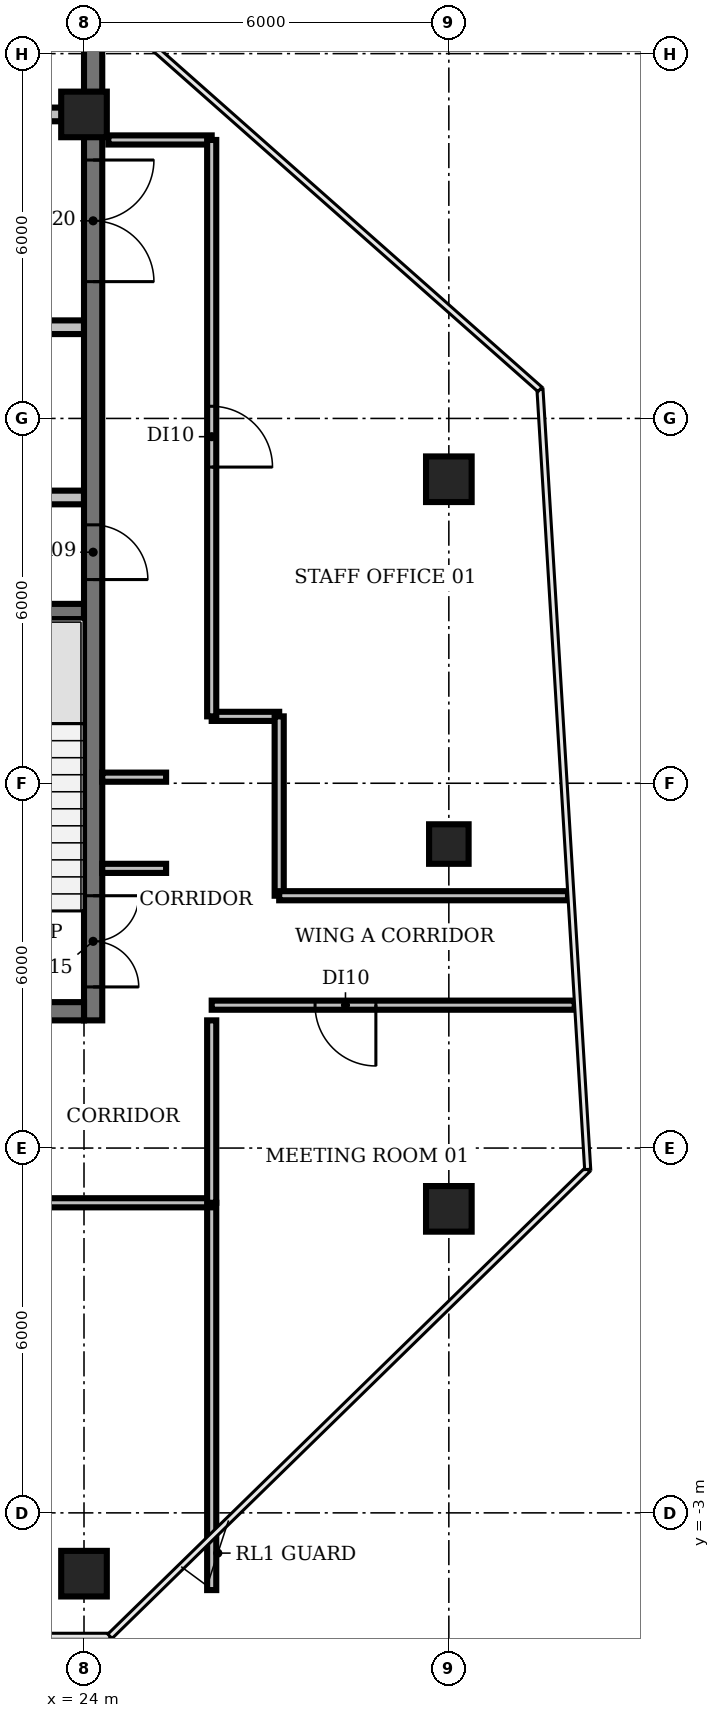
"""IFC4 building model, lengths in metres.
Left out: names, types, materials, properties, quantities, classifications, styles, units other than length and angle.
Written with IfcOpenShell. Run it as: python <this file> out.ifc"""

import sys

from ifc_helpers import new_model, si_unit, direction, frame, frame_2d, origin, origin_2d, place, context, subcontext, project, spatial, rectangle, circle, extrude, element, fill, save


model = new_model("IFC4")
c1 = context("Model", 3, precision=1e-05, world=origin(), true_north=direction((0.0, 1.0)))
c2 = subcontext(c1, "Body", "Model", "MODEL_VIEW")
j1 = project(units=[si_unit("LENGTHUNIT", "METRE"), si_unit("PLANEANGLEUNIT", "RADIAN")], contexts=[c1])
p1 = place(None, origin())
s1 = spatial("IfcSite", under=j1, at=p1, CompositionType="ELEMENT")
p2 = place(p1, origin())
s2 = spatial("IfcBuilding", under=s1, at=p2, CompositionType="ELEMENT")
p3 = place(p2, frame((0.0, 0.0, 318.8)))
s3 = spatial("IfcBuildingStorey", under=s2, at=p3, CompositionType="ELEMENT", Elevation=318.8)
for number, where, z_axis, x_axis in (
    (1, (24.0, -4.0, 0.0), (0.0, 0.0, 1.0), (1.0, 0.0, 0.0)),
    (2, (24.0, 20.0, 0.0), (0.0, 0.0, 1.0), (1.0, 0.0, 0.0)),
    (3, (30.0, 2.0, 0.0), (0.0, 0.0, 1.0), (1.0, 0.0, 0.0)),
):
    element("IfcColumn", number, at=place(p3, frame(where, z_axis=z_axis, x_axis=x_axis)), inside=s3, PredefinedType="COLUMN", context=c2, shape_type="SweptSolid", body=[
        extrude(circle(Radius=0.375, at=origin_2d()), origin(), (0.0, 0.0, 1.0), 3.9),
    ])
p4 = place(p3, frame((30.0, 8.0, 0.0), z_axis=(0.0, 0.0, 1.0), x_axis=(1.0, 0.0, 0.0)))
e4 = element("IfcColumn", 4, at=p4, inside=s3, PredefinedType="COLUMN", context=c2, shape_type="SweptSolid", body=[
    extrude(rectangle(XDim=0.65, YDim=0.65, at=origin_2d()), origin(), (0.0, 0.0, 1.0), 3.9),
])
p5 = place(p3, frame((30.0, 14.0, 0.0), z_axis=(0.0, 0.0, 1.0), x_axis=(1.0, 0.0, 0.0)))
e5 = element("IfcColumn", 5, at=p5, inside=s3, PredefinedType="COLUMN", context=c2, shape_type="SweptSolid", body=[
    extrude(circle(Radius=0.375, at=origin_2d()), origin(), (0.0, 0.0, 1.0), 3.9),
])
p6 = place(p3, frame((20.85, 11.825, 0.0), z_axis=(0.0, 0.0, 1.0), x_axis=(1.0, 0.0, 0.0)))
e6 = element("IfcWall", 6, at=p6, inside=s3, PredefinedType="SHEAR", context=c2, shape_type="SweptSolid", body=[
    extrude(rectangle(XDim=3.15, YDim=0.25, at=frame_2d((1.575, 0.0))), origin(), (0.0, 0.0, 1.0), 3.9),
])
p7 = place(p3, frame((16.6, 13.7, 0.0), z_axis=(0.0, 0.0, 1.0), x_axis=(1.0, 0.0, 0.0)))
e7 = element("IfcWall", 7, at=p7, inside=s3, PredefinedType="PARTITIONING", context=c2, shape_type="SweptSolid", body=[
    extrude(rectangle(XDim=7.4, YDim=0.225, at=frame_2d((3.7, 0.0))), origin(), (0.0, 0.0, 1.0), 3.9),
])
p8 = place(p3, frame((9.4, 16.5, 0.0), z_axis=(0.0, 0.0, 1.0), x_axis=(1.0, 0.0, 0.0)))
e8 = element("IfcWall", 8, at=p8, inside=s3, PredefinedType="PARTITIONING", context=c2, shape_type="SweptSolid", body=[
    extrude(rectangle(XDim=14.6, YDim=0.225, at=frame_2d((7.3, 0.0))), origin(), (0.0, 0.0, 1.0), 3.9),
])
p9 = place(p8, frame((0.55, 0.0, 0.0)))
e9 = element("IfcOpeningElement", 9, at=p9, cuts=e8, PredefinedType="OPENING", context=c2, shape_type="SweptSolid", body=[
    extrude(rectangle(XDim=0.9, YDim=2.1, at=frame_2d((0.45, 1.05))), frame((0.0, 0.123, 0.0), z_axis=(0.0, -1.0, 0.0), x_axis=(1.0, 0.0, 0.0)), (0.0, 0.0, 1.0), 0.245),
])
p10 = place(p8, frame((6.075, 0.0, 0.0)))
e10 = element("IfcOpeningElement", 10, at=p10, cuts=e8, PredefinedType="OPENING", context=c2, shape_type="SweptSolid", body=[
    extrude(rectangle(XDim=1.0, YDim=2.1, at=frame_2d((0.5, 1.05))), frame((0.0, 0.123, 0.0), z_axis=(0.0, -1.0, 0.0), x_axis=(1.0, 0.0, 0.0)), (0.0, 0.0, 1.0), 0.245),
])
p11 = place(p8, frame((12.4, 0.0, 0.0)))
e11 = element("IfcOpeningElement", 11, at=p11, cuts=e8, PredefinedType="OPENING", context=c2, shape_type="SweptSolid", body=[
    extrude(rectangle(XDim=1.0, YDim=2.1, at=frame_2d((0.5, 1.05))), frame((0.0, 0.123, 0.0), z_axis=(0.0, -1.0, 0.0), x_axis=(1.0, 0.0, 0.0)), (0.0, 0.0, 1.0), 0.245),
])
p12 = place(p3, frame((24.0, 20.0, 0.0), z_axis=(0.0, 0.0, 1.0), x_axis=(-1.0, 0.0, 0.0)))
e12 = element("IfcWall", 12, at=p12, inside=s3, PredefinedType="PARTITIONING", context=c2, shape_type="SweptSolid", body=[
    extrude(rectangle(XDim=14.6, YDim=0.225, at=frame_2d((7.3, 0.0))), origin(), (0.0, 0.0, 1.0), 3.9),
])
p13 = place(p12, frame((12.75, 0.0, 0.0)))
e13 = element("IfcOpeningElement", 13, at=p13, cuts=e12, PredefinedType="OPENING", context=c2, shape_type="SweptSolid", body=[
    extrude(rectangle(XDim=1.1, YDim=2.1, at=frame_2d((0.55, 1.05))), frame((0.0, 0.123, 0.0), z_axis=(0.0, -1.0, 0.0), x_axis=(1.0, 0.0, 0.0)), (0.0, 0.0, 1.0), 0.245),
])
p14 = place(p12, frame((9.95, 0.0, 0.0)))
e14 = element("IfcOpeningElement", 14, at=p14, cuts=e12, PredefinedType="OPENING", context=c2, shape_type="SweptSolid", body=[
    extrude(rectangle(XDim=1.1, YDim=2.1, at=frame_2d((0.55, 1.05))), frame((0.0, 0.123, 0.0), z_axis=(0.0, -1.0, 0.0), x_axis=(1.0, 0.0, 0.0)), (0.0, 0.0, 1.0), 0.245),
])
p15 = place(p12, frame((7.15, 0.0, 0.0)))
e15 = element("IfcOpeningElement", 15, at=p15, cuts=e12, PredefinedType="OPENING", context=c2, shape_type="SweptSolid", body=[
    extrude(rectangle(XDim=1.1, YDim=2.1, at=frame_2d((0.55, 1.05))), frame((0.0, 0.123, 0.0), z_axis=(0.0, -1.0, 0.0), x_axis=(1.0, 0.0, 0.0)), (0.0, 0.0, 1.0), 0.245),
])
p16 = place(p12, frame((4.35, 0.0, 0.0)))
e16 = element("IfcOpeningElement", 16, at=p16, cuts=e12, PredefinedType="OPENING", context=c2, shape_type="SweptSolid", body=[
    extrude(rectangle(XDim=1.1, YDim=2.1, at=frame_2d((0.55, 1.05))), frame((0.0, 0.123, 0.0), z_axis=(0.0, -1.0, 0.0), x_axis=(1.0, 0.0, 0.0)), (0.0, 0.0, 1.0), 0.245),
])
p17 = place(p12, frame((1.2, 0.0, 0.0)))
e17 = element("IfcOpeningElement", 17, at=p17, cuts=e12, PredefinedType="OPENING", context=c2, shape_type="SweptSolid", body=[
    extrude(rectangle(XDim=1.0, YDim=2.1, at=frame_2d((0.5, 1.05))), frame((0.0, 0.123, 0.0), z_axis=(0.0, -1.0, 0.0), x_axis=(1.0, 0.0, 0.0)), (0.0, 0.0, 1.0), 0.245),
])
p18 = place(p3, frame((24.15, 25.705, 0.0), z_axis=(0.0, 0.0, 1.0), x_axis=(0.0, -1.0, 0.0)))
e18 = element("IfcWall", 18, at=p18, inside=s3, PredefinedType="SHEAR", context=c2, shape_type="SweptSolid", body=[
    extrude(rectangle(XDim=20.605, YDim=0.3, at=frame_2d((10.302, 0.0))), origin(), (0.0, 0.0, 1.0), 3.9),
])
p19 = place(p18, frame((18.555, 0.0, 0.0)))
e19 = element("IfcOpeningElement", 19, at=p19, cuts=e18, PredefinedType="OPENING", context=c2, shape_type="SweptSolid", body=[
    extrude(rectangle(XDim=1.5, YDim=2.1, at=frame_2d((0.75, 1.05))), frame((0.0, 0.16, 0.0), z_axis=(0.0, -1.0, 0.0), x_axis=(1.0, 0.0, 0.0)), (0.0, 0.0, 1.0), 0.32),
])
p20 = place(p18, frame((12.455, 0.0, 0.0)))
e20 = element("IfcOpeningElement", 20, at=p20, cuts=e18, PredefinedType="OPENING", context=c2, shape_type="SweptSolid", body=[
    extrude(rectangle(XDim=0.9, YDim=2.1, at=frame_2d((0.45, 1.05))), frame((0.0, 0.16, 0.0), z_axis=(0.0, -1.0, 0.0), x_axis=(1.0, 0.0, 0.0)), (0.0, 0.0, 1.0), 0.32),
])
p21 = place(p18, frame((6.455, 0.0, 0.0)))
e21 = element("IfcOpeningElement", 21, at=p21, cuts=e18, PredefinedType="OPENING", context=c2, shape_type="SweptSolid", body=[
    extrude(rectangle(XDim=2.0, YDim=2.1, at=frame_2d((1.0, 1.05))), frame((0.0, 0.16, 0.0), z_axis=(0.0, -1.0, 0.0), x_axis=(1.0, 0.0, 0.0)), (0.0, 0.0, 1.0), 0.32),
])
p22 = place(p3, frame((24.0, 5.25, 0.0), z_axis=(0.0, 0.0, 1.0), x_axis=(-1.0, 0.0, 0.0)))
e22 = element("IfcWall", 22, at=p22, inside=s3, PredefinedType="SHEAR", context=c2, shape_type="SweptSolid", body=[
    extrude(rectangle(XDim=18.0, YDim=0.3, at=frame_2d((9.0, 0.0))), origin(), (0.0, 0.0, 1.0), 3.9),
])
p23 = place(p22, frame((13.0, 0.0, 0.0)))
e23 = element("IfcOpeningElement", 23, at=p23, cuts=e22, PredefinedType="OPENING", context=c2, shape_type="SweptSolid", body=[
    extrude(rectangle(XDim=1.2, YDim=2.1, at=frame_2d((0.6, 1.05))), frame((0.0, 0.16, 0.0), z_axis=(0.0, -1.0, 0.0), x_axis=(1.0, 0.0, 0.0)), (0.0, 0.0, 1.0), 0.32),
])
p24 = place(p22, frame((4.9, 0.0, 0.0)))
e24 = element("IfcOpeningElement", 24, at=p24, cuts=e22, PredefinedType="OPENING", context=c2, shape_type="SweptSolid", body=[
    extrude(rectangle(XDim=1.0, YDim=2.1, at=frame_2d((0.5, 1.05))), frame((0.0, 0.16, 0.0), z_axis=(0.0, -1.0, 0.0), x_axis=(1.0, 0.0, 0.0)), (0.0, 0.0, 1.0), 0.32),
])
for number, where, z_axis, x_axis in (
    (25, (24.3, 7.6, 0.0), (0.0, 0.0, 1.0), (1.0, 0.0, 0.0)),
    (26, (24.3, 9.1, 0.0), (0.0, 0.0, 1.0), (1.0, 0.0, 0.0)),
):
    element("IfcWall", number, at=place(p3, frame(where, z_axis=z_axis, x_axis=x_axis)), inside=s3, PredefinedType="PARTITIONING", context=c2, shape_type="SweptSolid", body=[
        extrude(rectangle(XDim=1.05, YDim=0.15, at=frame_2d((0.525, 0.0))), origin(), (0.0, 0.0, 1.0), 2.95),
    ])
p25 = place(p3, frame((24.4, 19.58, 0.0), z_axis=(0.0, 0.0, 1.0), x_axis=(1.0, 0.0, 0.0)))
e27 = element("IfcWall", 27, at=p25, inside=s3, PredefinedType="PARTITIONING", context=c2, shape_type="SweptSolid", body=[
    extrude(rectangle(XDim=1.7, YDim=0.15, at=frame_2d((0.85, 0.0))), origin(), (0.0, 0.0, 1.0), 2.95),
])
p26 = place(p3, frame((26.1, -4.27, 0.0), z_axis=(0.0, 0.0, 1.0), x_axis=(0.0, 1.0, 0.0)))
e28 = element("IfcWall", 28, at=p26, inside=s3, PredefinedType="PARTITIONING", context=c2, shape_type="SweptSolid", body=[
    extrude(rectangle(XDim=6.37, YDim=0.15, at=frame_2d((3.185, 0.0))), origin(), (0.0, 0.0, 1.0), 2.95),
])
p27 = place(p3, frame((26.1, 2.1, 0.0), z_axis=(0.0, 0.0, 1.0), x_axis=(-1.0, 0.0, 0.0)))
e29 = element("IfcWall", 29, at=p27, inside=s3, PredefinedType="PARTITIONING", context=c2, shape_type="SweptSolid", body=[
    extrude(rectangle(XDim=22.2, YDim=0.15, at=frame_2d((11.1, 0.0))), origin(), (0.0, 0.0, 1.0), 2.95),
])
p28 = place(p27, frame((10.6, 0.0, 0.0)))
e30 = element("IfcOpeningElement", 30, at=p28, cuts=e29, PredefinedType="OPENING", context=c2, shape_type="SweptSolid", body=[
    extrude(rectangle(XDim=1.2, YDim=2.1, at=frame_2d((0.6, 1.05))), frame((0.0, 0.085, 0.0), z_axis=(0.0, -1.0, 0.0), x_axis=(1.0, 0.0, 0.0)), (0.0, 0.0, 1.0), 0.17),
])
p29 = place(p3, frame((26.1, 2.1, 0.0), z_axis=(0.0, 0.0, 1.0), x_axis=(0.0, 1.0, 0.0)))
e31 = element("IfcWall", 31, at=p29, inside=s3, PredefinedType="PARTITIONING", context=c2, shape_type="SweptSolid", body=[
    extrude(rectangle(XDim=3.0, YDim=0.15, at=frame_2d((1.5, 0.0))), origin(), (0.0, 0.0, 1.0), 2.95),
])
p30 = place(p3, frame((26.1, 10.1, 0.0), z_axis=(0.0, 0.0, 1.0), x_axis=(1.0, 0.0, 0.0)))
e32 = element("IfcWall", 32, at=p30, inside=s3, PredefinedType="PARTITIONING", context=c2, shape_type="SweptSolid", body=[
    extrude(rectangle(XDim=1.11, YDim=0.15, at=frame_2d((0.555, 0.0))), origin(), (0.0, 0.0, 1.0), 2.95),
])
p31 = place(p3, frame((26.1, 19.58, 0.0), z_axis=(0.0, 0.0, 1.0), x_axis=(0.0, -1.0, 0.0)))
e33 = element("IfcWall", 33, at=p31, inside=s3, PredefinedType="PARTITIONING", context=c2, shape_type="SweptSolid", body=[
    extrude(rectangle(XDim=9.48, YDim=0.15, at=frame_2d((4.74, 0.0))), origin(), (0.0, 0.0, 1.0), 2.95),
])
p32 = place(p31, frame((4.38, 0.0, 0.0)))
e34 = element("IfcOpeningElement", 34, at=p32, cuts=e33, PredefinedType="OPENING", context=c2, shape_type="SweptSolid", body=[
    extrude(rectangle(XDim=1.0, YDim=2.1, at=frame_2d((0.5, 1.05))), frame((0.0, 0.085, 0.0), z_axis=(0.0, -1.0, 0.0), x_axis=(1.0, 0.0, 0.0)), (0.0, 0.0, 1.0), 0.17),
])
p33 = place(p3, frame((27.21, 7.15, 0.0), z_axis=(0.0, 0.0, 1.0), x_axis=(0.0, 1.0, 0.0)))
e35 = element("IfcWall", 35, at=p33, inside=s3, PredefinedType="PARTITIONING", context=c2, shape_type="SweptSolid", body=[
    extrude(rectangle(XDim=2.95, YDim=0.15, at=frame_2d((1.475, 0.0))), origin(), (0.0, 0.0, 1.0), 2.95),
])
p34 = place(p3, frame((27.21, 7.15, 0.0), z_axis=(0.0, 0.0, 1.0), x_axis=(1.0, 0.0, 0.0)))
e36 = element("IfcWall", 36, at=p34, inside=s3, PredefinedType="PARTITIONING", context=c2, shape_type="SweptSolid", body=[
    extrude(rectangle(XDim=4.75, YDim=0.15, at=frame_2d((2.375, 0.0))), origin(), (0.0, 0.0, 1.0), 2.95),
])
p35 = place(p3, frame((32.07, 5.35, 0.0), z_axis=(0.0, 0.0, 1.0), x_axis=(-1.0, 0.0, 0.0)))
e37 = element("IfcWall", 37, at=p35, inside=s3, PredefinedType="PARTITIONING", context=c2, shape_type="SweptSolid", body=[
    extrude(rectangle(XDim=5.97, YDim=0.15, at=frame_2d((2.985, 0.0))), origin(), (0.0, 0.0, 1.0), 2.95),
])
p36 = place(p35, frame((3.27, 0.0, 0.0)))
e38 = element("IfcOpeningElement", 38, at=p36, cuts=e37, PredefinedType="OPENING", context=c2, shape_type="SweptSolid", body=[
    extrude(rectangle(XDim=1.0, YDim=2.1, at=frame_2d((0.5, 1.05))), frame((0.0, 0.085, 0.0), z_axis=(0.0, -1.0, 0.0), x_axis=(1.0, 0.0, 0.0)), (0.0, 0.0, 1.0), 0.17),
])
p37 = place(p19, origin())
e39 = element("IfcDoor", 39, at=p37, inside=s3, OperationType="DOUBLE_DOOR_SINGLE_SWING", PredefinedType="DOOR", context=c2, shape_type="SweptSolid", body=[
    extrude(rectangle(XDim=1.5, YDim=2.1, at=frame_2d((0.75, 1.05))), frame((0.0, 0.025, 0.0), z_axis=(0.0, -1.0, 0.0), x_axis=(1.0, 0.0, 0.0)), (0.0, 0.0, 1.0), 0.05),
])
fill(e19, e39)
p38 = place(p20, origin())
e40 = element("IfcDoor", 40, at=p38, inside=s3, OperationType="SINGLE_SWING_RIGHT", PredefinedType="DOOR", context=c2, shape_type="SweptSolid", body=[
    extrude(rectangle(XDim=0.9, YDim=2.1, at=frame_2d((0.45, 1.05))), frame((0.0, 0.025, 0.0), z_axis=(0.0, -1.0, 0.0), x_axis=(1.0, 0.0, 0.0)), (0.0, 0.0, 1.0), 0.05),
])
fill(e20, e40)
p39 = place(p21, origin())
e41 = element("IfcDoor", 41, at=p39, inside=s3, OperationType="DOUBLE_DOOR_SINGLE_SWING", PredefinedType="DOOR", context=c2, shape_type="SweptSolid", body=[
    extrude(rectangle(XDim=2.0, YDim=2.1, at=frame_2d((1.0, 1.05))), frame((0.0, 0.025, 0.0), z_axis=(0.0, -1.0, 0.0), x_axis=(1.0, 0.0, 0.0)), (0.0, 0.0, 1.0), 0.05),
])
fill(e21, e41)
p40 = place(p32, origin())
e42 = element("IfcDoor", 42, at=p40, inside=s3, OperationType="SINGLE_SWING_RIGHT", PredefinedType="DOOR", context=c2, shape_type="SweptSolid", body=[
    extrude(rectangle(XDim=1.0, YDim=2.1, at=frame_2d((0.5, 1.05))), frame((0.0, 0.025, 0.0), z_axis=(0.0, -1.0, 0.0), x_axis=(1.0, 0.0, 0.0)), (0.0, 0.0, 1.0), 0.05),
])
fill(e34, e42)
p41 = place(p36, origin())
e43 = element("IfcDoor", 43, at=p41, inside=s3, OperationType="SINGLE_SWING_LEFT", PredefinedType="DOOR", context=c2, shape_type="SweptSolid", body=[
    extrude(rectangle(XDim=1.0, YDim=2.1, at=frame_2d((0.5, 1.05))), frame((0.0, 0.025, 0.0), z_axis=(0.0, -1.0, 0.0), x_axis=(1.0, 0.0, 0.0)), (0.0, 0.0, 1.0), 0.05),
])
fill(e38, e43)
save(model, sys.argv[1])
